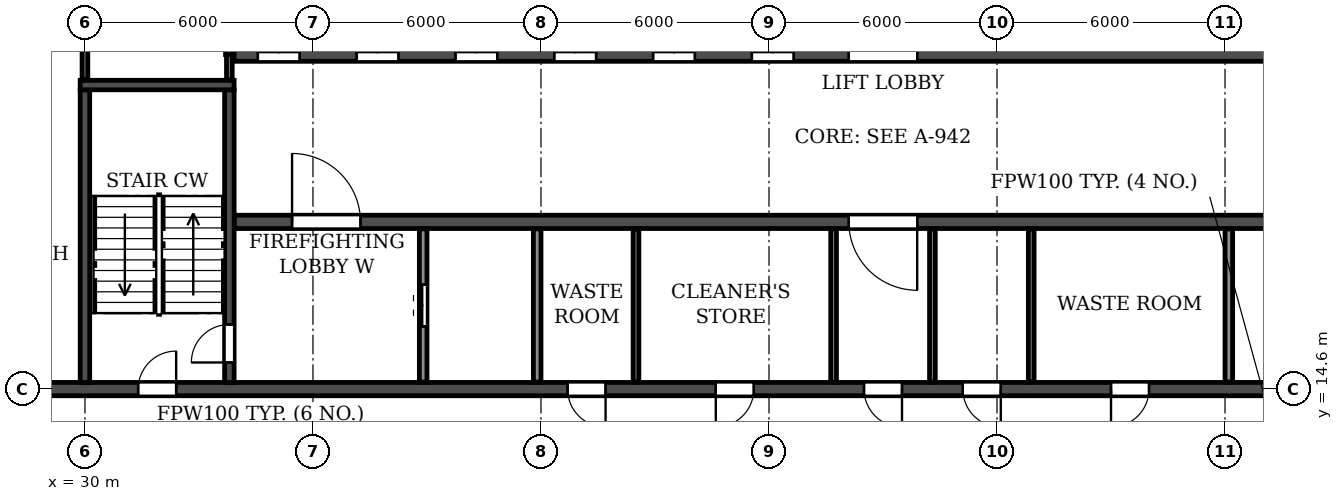
"""IFC4 building model, lengths in metres.
Left out: names, types, materials, properties, quantities, classifications, styles, units other than length and angle.
Written with IfcOpenShell. Run it as: python <this file> out.ifc"""

import sys

from ifc_helpers import new_model, si_unit, direction, frame, frame_2d, origin, place, context, subcontext, project, spatial, rectangle, extrude, element, fill, save


model = new_model("IFC4")
c1 = context("Model", 3, precision=1e-05, world=origin(), true_north=direction((0.0, 1.0)))
c2 = subcontext(c1, "Body", "Model", "MODEL_VIEW")
j1 = project(units=[si_unit("LENGTHUNIT", "METRE"), si_unit("PLANEANGLEUNIT", "RADIAN")], contexts=[c1])
p1 = place(None, origin())
s1 = spatial("IfcSite", under=j1, at=p1, CompositionType="ELEMENT")
p2 = place(p1, origin())
s2 = spatial("IfcBuilding", under=s1, at=p2, CompositionType="ELEMENT")
p3 = place(p2, frame((0.0, 0.0, 251.1)))
s3 = spatial("IfcBuildingStorey", under=s2, at=p3, CompositionType="ELEMENT", Elevation=251.1)
p4 = place(p3, frame((18.2, 14.6, 0.0), z_axis=(0.0, 0.0, 1.0), x_axis=(1.0, 0.0, 0.0)))
e1 = element("IfcWall", 1, at=p4, inside=s3, PredefinedType="SOLIDWALL", context=c2, shape_type="SweptSolid", body=[
    extrude(rectangle(XDim=65.6, YDim=0.35, at=frame_2d((32.8, 0.0))), origin(), (0.0, 0.0, 1.0), 3.08),
])
p5 = place(p4, frame((0.7, 0.0, 0.0)))
e2 = element("IfcOpeningElement", 2, at=p5, cuts=e1, PredefinedType="OPENING", context=c2, shape_type="SweptSolid", body=[
    extrude(rectangle(XDim=1.0, YDim=2.1, at=frame_2d((0.5, 1.05))), frame((0.0, 0.185, 0.0), z_axis=(0.0, -1.0, 0.0), x_axis=(1.0, 0.0, 0.0)), (0.0, 0.0, 1.0), 0.37),
])
p6 = place(p4, frame((8.6, 0.0, 0.0)))
e3 = element("IfcOpeningElement", 3, at=p6, cuts=e1, PredefinedType="OPENING", context=c2, shape_type="SweptSolid", body=[
    extrude(rectangle(XDim=1.0, YDim=2.1, at=frame_2d((0.5, 1.05))), frame((0.0, 0.185, 0.0), z_axis=(0.0, -1.0, 0.0), x_axis=(1.0, 0.0, 0.0)), (0.0, 0.0, 1.0), 0.37),
])
p7 = place(p4, frame((13.2, 0.0, 0.0)))
e4 = element("IfcOpeningElement", 4, at=p7, cuts=e1, PredefinedType="OPENING", context=c2, shape_type="SweptSolid", body=[
    extrude(rectangle(XDim=1.0, YDim=2.1, at=frame_2d((0.5, 1.05))), frame((0.0, 0.185, 0.0), z_axis=(0.0, -1.0, 0.0), x_axis=(1.0, 0.0, 0.0)), (0.0, 0.0, 1.0), 0.37),
])
p8 = place(p4, frame((24.5, 0.0, 0.0)))
e5 = element("IfcOpeningElement", 5, at=p8, cuts=e1, PredefinedType="OPENING", context=c2, shape_type="SweptSolid", body=[
    extrude(rectangle(XDim=1.0, YDim=2.1, at=frame_2d((0.5, 1.05))), frame((0.0, 0.185, 0.0), z_axis=(0.0, -1.0, 0.0), x_axis=(1.0, 0.0, 0.0)), (0.0, 0.0, 1.0), 0.37),
])
p9 = place(p4, frame((28.4, 0.0, 0.0)))
e6 = element("IfcOpeningElement", 6, at=p9, cuts=e1, PredefinedType="OPENING", context=c2, shape_type="SweptSolid", body=[
    extrude(rectangle(XDim=1.0, YDim=2.1, at=frame_2d((0.5, 1.05))), frame((0.0, 0.185, 0.0), z_axis=(0.0, -1.0, 0.0), x_axis=(1.0, 0.0, 0.0)), (0.0, 0.0, 1.0), 0.37),
])
p10 = place(p4, frame((32.3, 0.0, 0.0)))
e7 = element("IfcOpeningElement", 7, at=p10, cuts=e1, PredefinedType="OPENING", context=c2, shape_type="SweptSolid", body=[
    extrude(rectangle(XDim=1.0, YDim=2.1, at=frame_2d((0.5, 1.05))), frame((0.0, 0.185, 0.0), z_axis=(0.0, -1.0, 0.0), x_axis=(1.0, 0.0, 0.0)), (0.0, 0.0, 1.0), 0.37),
])
p11 = place(p4, frame((34.9, 0.0, 0.0)))
e8 = element("IfcOpeningElement", 8, at=p11, cuts=e1, PredefinedType="OPENING", context=c2, shape_type="SweptSolid", body=[
    extrude(rectangle(XDim=1.0, YDim=2.1, at=frame_2d((0.5, 1.05))), frame((0.0, 0.185, 0.0), z_axis=(0.0, -1.0, 0.0), x_axis=(1.0, 0.0, 0.0)), (0.0, 0.0, 1.0), 0.37),
])
p12 = place(p4, frame((38.8, 0.0, 0.0)))
e9 = element("IfcOpeningElement", 9, at=p12, cuts=e1, PredefinedType="OPENING", context=c2, shape_type="SweptSolid", body=[
    extrude(rectangle(XDim=1.0, YDim=2.1, at=frame_2d((0.5, 1.05))), frame((0.0, 0.185, 0.0), z_axis=(0.0, -1.0, 0.0), x_axis=(1.0, 0.0, 0.0)), (0.0, 0.0, 1.0), 0.37),
])
p13 = place(p4, frame((51.4, 0.0, 0.0)))
e10 = element("IfcOpeningElement", 10, at=p13, cuts=e1, PredefinedType="OPENING", context=c2, shape_type="SweptSolid", body=[
    extrude(rectangle(XDim=1.0, YDim=2.1, at=frame_2d((0.5, 1.05))), frame((0.0, 0.185, 0.0), z_axis=(0.0, -1.0, 0.0), x_axis=(1.0, 0.0, 0.0)), (0.0, 0.0, 1.0), 0.37),
])
p14 = place(p4, frame((56.0, 0.0, 0.0)))
e11 = element("IfcOpeningElement", 11, at=p14, cuts=e1, PredefinedType="OPENING", context=c2, shape_type="SweptSolid", body=[
    extrude(rectangle(XDim=1.0, YDim=2.1, at=frame_2d((0.5, 1.05))), frame((0.0, 0.185, 0.0), z_axis=(0.0, -1.0, 0.0), x_axis=(1.0, 0.0, 0.0)), (0.0, 0.0, 1.0), 0.37),
])
p15 = place(p4, frame((63.9, 0.0, 0.0)))
e12 = element("IfcOpeningElement", 12, at=p15, cuts=e1, PredefinedType="OPENING", context=c2, shape_type="SweptSolid", body=[
    extrude(rectangle(XDim=1.0, YDim=2.1, at=frame_2d((0.5, 1.05))), frame((0.0, 0.185, 0.0), z_axis=(0.0, -1.0, 0.0), x_axis=(1.0, 0.0, 0.0)), (0.0, 0.0, 1.0), 0.37),
])
p16 = place(p3, frame((33.925, 19.0, 0.0), z_axis=(0.0, 0.0, 1.0), x_axis=(1.0, 0.0, 0.0)))
e13 = element("IfcWall", 13, at=p16, inside=s3, PredefinedType="SOLIDWALL", context=c2, shape_type="SweptSolid", body=[
    extrude(rectangle(XDim=34.15, YDim=0.35, at=frame_2d((17.075, 0.0))), origin(), (0.0, 0.0, 1.0), 3.08),
])
p17 = place(p16, frame((16.175, 0.0, 0.0)))
e14 = element("IfcOpeningElement", 14, at=p17, cuts=e13, PredefinedType="OPENING", context=c2, shape_type="SweptSolid", body=[
    extrude(rectangle(XDim=1.8, YDim=2.1, at=frame_2d((0.9, 1.05))), frame((0.0, 0.185, 0.0), z_axis=(0.0, -1.0, 0.0), x_axis=(1.0, 0.0, 0.0)), (0.0, 0.0, 1.0), 0.37),
])
p18 = place(p16, frame((1.525, 0.0, 0.0)))
e15 = element("IfcOpeningElement", 15, at=p18, cuts=e13, PredefinedType="OPENING", context=c2, shape_type="SweptSolid", body=[
    extrude(rectangle(XDim=1.8, YDim=2.1, at=frame_2d((0.9, 1.05))), frame((0.0, 0.185, 0.0), z_axis=(0.0, -1.0, 0.0), x_axis=(1.0, 0.0, 0.0)), (0.0, 0.0, 1.0), 0.37),
])
p19 = place(p16, frame((30.825, 0.0, 0.0)))
e16 = element("IfcOpeningElement", 16, at=p19, cuts=e13, PredefinedType="OPENING", context=c2, shape_type="SweptSolid", body=[
    extrude(rectangle(XDim=1.8, YDim=2.1, at=frame_2d((0.9, 1.05))), frame((0.0, 0.185, 0.0), z_axis=(0.0, -1.0, 0.0), x_axis=(1.0, 0.0, 0.0)), (0.0, 0.0, 1.0), 0.37),
])
p20 = place(p3, frame((33.925, 23.4, 0.0), z_axis=(0.0, 0.0, 1.0), x_axis=(1.0, 0.0, 0.0)))
e17 = element("IfcWall", 17, at=p20, inside=s3, PredefinedType="SOLIDWALL", context=c2, shape_type="SweptSolid", body=[
    extrude(rectangle(XDim=34.15, YDim=0.35, at=frame_2d((17.075, 0.0))), origin(), (0.0, 0.0, 1.0), 3.08),
])
p21 = place(p20, frame((16.175, 0.0, 0.0)))
e18 = element("IfcOpeningElement", 18, at=p21, cuts=e17, PredefinedType="OPENING", context=c2, shape_type="SweptSolid", body=[
    extrude(rectangle(XDim=1.8, YDim=2.1, at=frame_2d((0.9, 1.05))), frame((0.0, 0.185, 0.0), z_axis=(0.0, -1.0, 0.0), x_axis=(1.0, 0.0, 0.0)), (0.0, 0.0, 1.0), 0.37),
])
p22 = place(p20, frame((0.625, 0.0, 0.0)))
e19 = element("IfcOpeningElement", 19, at=p22, cuts=e17, PredefinedType="OPENING", context=c2, shape_type="SweptSolid", body=[
    extrude(rectangle(XDim=1.1, YDim=2.1, at=frame_2d((0.55, 1.05))), frame((0.0, 0.185, 0.0), z_axis=(0.0, -1.0, 0.0), x_axis=(1.0, 0.0, 0.0)), (0.0, 0.0, 1.0), 0.37),
])
p23 = place(p20, frame((3.225, 0.0, 0.0)))
e20 = element("IfcOpeningElement", 20, at=p23, cuts=e17, PredefinedType="OPENING", context=c2, shape_type="SweptSolid", body=[
    extrude(rectangle(XDim=1.1, YDim=2.1, at=frame_2d((0.55, 1.05))), frame((0.0, 0.185, 0.0), z_axis=(0.0, -1.0, 0.0), x_axis=(1.0, 0.0, 0.0)), (0.0, 0.0, 1.0), 0.37),
])
p24 = place(p20, frame((5.825, 0.0, 0.0)))
e21 = element("IfcOpeningElement", 21, at=p24, cuts=e17, PredefinedType="OPENING", context=c2, shape_type="SweptSolid", body=[
    extrude(rectangle(XDim=1.1, YDim=2.1, at=frame_2d((0.55, 1.05))), frame((0.0, 0.185, 0.0), z_axis=(0.0, -1.0, 0.0), x_axis=(1.0, 0.0, 0.0)), (0.0, 0.0, 1.0), 0.37),
])
p25 = place(p20, frame((8.425, 0.0, 0.0)))
e22 = element("IfcOpeningElement", 22, at=p25, cuts=e17, PredefinedType="OPENING", context=c2, shape_type="SweptSolid", body=[
    extrude(rectangle(XDim=1.1, YDim=2.1, at=frame_2d((0.55, 1.05))), frame((0.0, 0.185, 0.0), z_axis=(0.0, -1.0, 0.0), x_axis=(1.0, 0.0, 0.0)), (0.0, 0.0, 1.0), 0.37),
])
p26 = place(p20, frame((11.025, 0.0, 0.0)))
e23 = element("IfcOpeningElement", 23, at=p26, cuts=e17, PredefinedType="OPENING", context=c2, shape_type="SweptSolid", body=[
    extrude(rectangle(XDim=1.1, YDim=2.1, at=frame_2d((0.55, 1.05))), frame((0.0, 0.185, 0.0), z_axis=(0.0, -1.0, 0.0), x_axis=(1.0, 0.0, 0.0)), (0.0, 0.0, 1.0), 0.37),
])
p27 = place(p20, frame((13.625, 0.0, 0.0)))
e24 = element("IfcOpeningElement", 24, at=p27, cuts=e17, PredefinedType="OPENING", context=c2, shape_type="SweptSolid", body=[
    extrude(rectangle(XDim=1.1, YDim=2.1, at=frame_2d((0.55, 1.05))), frame((0.0, 0.185, 0.0), z_axis=(0.0, -1.0, 0.0), x_axis=(1.0, 0.0, 0.0)), (0.0, 0.0, 1.0), 0.37),
])
p28 = place(p20, frame((27.225, 0.0, 0.0)))
e25 = element("IfcOpeningElement", 25, at=p28, cuts=e17, PredefinedType="OPENING", context=c2, shape_type="SweptSolid", body=[
    extrude(rectangle(XDim=1.1, YDim=2.1, at=frame_2d((0.55, 1.05))), frame((0.0, 0.185, 0.0), z_axis=(0.0, -1.0, 0.0), x_axis=(1.0, 0.0, 0.0)), (0.0, 0.0, 1.0), 0.37),
])
p29 = place(p3, frame((30.0, 14.775, 0.0), z_axis=(0.0, 0.0, 1.0), x_axis=(0.0, 1.0, 0.0)))
e26 = element("IfcWall", 26, at=p29, inside=s3, PredefinedType="SOLIDWALL", context=c2, shape_type="SweptSolid", body=[
    extrude(rectangle(XDim=7.7, YDim=0.25, at=frame_2d((3.85, 0.0))), origin(), (0.0, 0.0, 1.0), 3.08),
])
p30 = place(p3, frame((33.8, 14.775, 0.0), z_axis=(0.0, 0.0, 1.0), x_axis=(0.0, 1.0, 0.0)))
e27 = element("IfcWall", 27, at=p30, inside=s3, PredefinedType="SOLIDWALL", context=c2, shape_type="SweptSolid", body=[
    extrude(rectangle(XDim=7.7, YDim=0.25, at=frame_2d((3.85, 0.0))), origin(), (0.0, 0.0, 1.0), 3.08),
])
p31 = place(p30, frame((0.525, 0.0, 0.0)))
e28 = element("IfcOpeningElement", 28, at=p31, cuts=e27, PredefinedType="OPENING", context=c2, shape_type="SweptSolid", body=[
    extrude(rectangle(XDim=1.0, YDim=2.1, at=frame_2d((0.5, 1.05))), frame((0.0, 0.135, 0.0), z_axis=(0.0, -1.0, 0.0), x_axis=(1.0, 0.0, 0.0)), (0.0, 0.0, 1.0), 0.27),
])
p32 = place(p3, frame((29.875, 22.6, 0.0), z_axis=(0.0, 0.0, 1.0), x_axis=(1.0, 0.0, 0.0)))
e29 = element("IfcWall", 29, at=p32, inside=s3, PredefinedType="SOLIDWALL", context=c2, shape_type="SweptSolid", body=[
    extrude(rectangle(XDim=4.05, YDim=0.25, at=frame_2d((2.025, 0.0))), origin(), (0.0, 0.0, 1.0), 3.08),
])
for number, where, z_axis, x_axis in (
    (30, (49.7, 14.785, 0.0), (0.0, 0.0, 1.0), (0.0, 1.0, 0.0)),
    (31, (52.3, 14.785, 0.0), (0.0, 0.0, 1.0), (0.0, 1.0, 0.0)),
    (32, (44.5, 14.785, 0.0), (0.0, 0.0, 1.0), (0.0, 1.0, 0.0)),
    (33, (54.9, 14.785, 0.0), (0.0, 0.0, 1.0), (0.0, 1.0, 0.0)),
):
    element("IfcWall", number, at=place(p3, frame(where, z_axis=z_axis, x_axis=x_axis)), inside=s3, PredefinedType="PARTITIONING", context=c2, shape_type="SweptSolid", body=[
        extrude(rectangle(XDim=4.03, YDim=0.15, at=frame_2d((2.015, 0.0))), origin(), (0.0, 0.0, 1.0), 3.08),
    ])
p33 = place(p3, frame((30.0, 22.735, 0.0), z_axis=(0.0, 0.0, 1.0), x_axis=(0.0, 1.0, 0.0)))
e34 = element("IfcWall", 34, at=p33, inside=s3, PredefinedType="PARTITIONING", context=c2, shape_type="SweptSolid", body=[
    extrude(rectangle(XDim=4.88, YDim=0.15, at=frame_2d((2.44, 0.0))), origin(), (0.0, 0.0, 1.0), 3.08),
])
p34 = place(p3, frame((33.8, 22.735, 0.0), z_axis=(0.0, 0.0, 1.0), x_axis=(0.0, 1.0, 0.0)))
e35 = element("IfcWall", 35, at=p34, inside=s3, PredefinedType="PARTITIONING", context=c2, shape_type="SweptSolid", body=[
    extrude(rectangle(XDim=0.665, YDim=0.15, at=frame_2d((0.333, 0.0))), origin(), (0.0, 0.0, 1.0), 3.08),
])
p35 = place(p3, frame((33.8, 23.4, 0.0), z_axis=(0.0, 0.0, 1.0), x_axis=(0.0, 1.0, 0.0)))
e36 = element("IfcWall", 36, at=p35, inside=s3, PredefinedType="PARTITIONING", context=c2, shape_type="SweptSolid", body=[
    extrude(rectangle(XDim=2.7, YDim=0.2, at=frame_2d((1.35, 0.0))), origin(), (0.0, 0.0, 1.0), 3.08),
])
p36 = place(p3, frame((38.9, 14.785, 0.0), z_axis=(0.0, 0.0, 1.0), x_axis=(0.0, 1.0, 0.0)))
e37 = element("IfcWall", 37, at=p36, inside=s3, PredefinedType="PARTITIONING", context=c2, shape_type="SweptSolid", body=[
    extrude(rectangle(XDim=4.03, YDim=0.2, at=frame_2d((2.015, 0.0))), origin(), (0.0, 0.0, 1.0), 3.08),
])
p37 = place(p36, frame((1.465, 0.0, 0.0)))
e38 = element("IfcOpeningElement", 38, at=p37, cuts=e37, PredefinedType="OPENING", context=c2, shape_type="SweptSolid", body=[
    extrude(rectangle(XDim=1.1, YDim=2.1, at=frame_2d((0.55, 1.05))), frame((0.0, 0.11, 0.0), z_axis=(0.0, -1.0, 0.0), x_axis=(1.0, 0.0, 0.0)), (0.0, 0.0, 1.0), 0.22),
])
for number, where, z_axis, x_axis in (
    (39, (41.9, 14.785, 0.0), (0.0, 0.0, 1.0), (0.0, 1.0, 0.0)),
    (40, (60.1, 14.785, 0.0), (0.0, 0.0, 1.0), (0.0, 1.0, 0.0)),
):
    element("IfcWall", number, at=place(p3, frame(where, z_axis=z_axis, x_axis=x_axis)), inside=s3, PredefinedType="PARTITIONING", context=c2, shape_type="SweptSolid", body=[
        extrude(rectangle(XDim=4.03, YDim=0.2, at=frame_2d((2.015, 0.0))), origin(), (0.0, 0.0, 1.0), 3.08),
    ])
p38 = place(p7, origin())
e41 = element("IfcDoor", 41, at=p38, inside=s3, OperationType="SINGLE_SWING_RIGHT", PredefinedType="DOOR", context=c2, shape_type="SweptSolid", body=[
    extrude(rectangle(XDim=1.0, YDim=2.1, at=frame_2d((0.5, 1.05))), frame((0.0, 0.025, 0.0), z_axis=(0.0, -1.0, 0.0), x_axis=(1.0, 0.0, 0.0)), (0.0, 0.0, 1.0), 0.05),
])
fill(e4, e41)
p39 = place(p8, frame((1.0, 0.0, 0.0), z_axis=(0.0, 0.0, 1.0), x_axis=(-1.0, 0.0, 0.0)))
e42 = element("IfcDoor", 42, at=p39, inside=s3, OperationType="SINGLE_SWING_LEFT", PredefinedType="DOOR", context=c2, shape_type="SweptSolid", body=[
    extrude(rectangle(XDim=1.0, YDim=2.1, at=frame_2d((0.5, 1.05))), frame((0.0, 0.025, 0.0), z_axis=(0.0, -1.0, 0.0), x_axis=(1.0, 0.0, 0.0)), (0.0, 0.0, 1.0), 0.05),
])
fill(e5, e42)
p40 = place(p9, frame((1.0, 0.0, 0.0), z_axis=(0.0, 0.0, 1.0), x_axis=(-1.0, 0.0, 0.0)))
e43 = element("IfcDoor", 43, at=p40, inside=s3, OperationType="SINGLE_SWING_RIGHT", PredefinedType="DOOR", context=c2, shape_type="SweptSolid", body=[
    extrude(rectangle(XDim=1.0, YDim=2.1, at=frame_2d((0.5, 1.05))), frame((0.0, 0.025, 0.0), z_axis=(0.0, -1.0, 0.0), x_axis=(1.0, 0.0, 0.0)), (0.0, 0.0, 1.0), 0.05),
])
fill(e6, e43)
p41 = place(p10, frame((1.0, 0.0, 0.0), z_axis=(0.0, 0.0, 1.0), x_axis=(-1.0, 0.0, 0.0)))
e44 = element("IfcDoor", 44, at=p41, inside=s3, OperationType="SINGLE_SWING_LEFT", PredefinedType="DOOR", context=c2, shape_type="SweptSolid", body=[
    extrude(rectangle(XDim=1.0, YDim=2.1, at=frame_2d((0.5, 1.05))), frame((0.0, 0.025, 0.0), z_axis=(0.0, -1.0, 0.0), x_axis=(1.0, 0.0, 0.0)), (0.0, 0.0, 1.0), 0.05),
])
fill(e7, e44)
p42 = place(p11, frame((1.0, 0.0, 0.0), z_axis=(0.0, 0.0, 1.0), x_axis=(-1.0, 0.0, 0.0)))
e45 = element("IfcDoor", 45, at=p42, inside=s3, OperationType="SINGLE_SWING_LEFT", PredefinedType="DOOR", context=c2, shape_type="SweptSolid", body=[
    extrude(rectangle(XDim=1.0, YDim=2.1, at=frame_2d((0.5, 1.05))), frame((0.0, 0.025, 0.0), z_axis=(0.0, -1.0, 0.0), x_axis=(1.0, 0.0, 0.0)), (0.0, 0.0, 1.0), 0.05),
])
fill(e8, e45)
p43 = place(p12, frame((1.0, 0.0, 0.0), z_axis=(0.0, 0.0, 1.0), x_axis=(-1.0, 0.0, 0.0)))
e46 = element("IfcDoor", 46, at=p43, inside=s3, OperationType="SINGLE_SWING_RIGHT", PredefinedType="DOOR", context=c2, shape_type="SweptSolid", body=[
    extrude(rectangle(XDim=1.0, YDim=2.1, at=frame_2d((0.5, 1.05))), frame((0.0, 0.025, 0.0), z_axis=(0.0, -1.0, 0.0), x_axis=(1.0, 0.0, 0.0)), (0.0, 0.0, 1.0), 0.05),
])
fill(e9, e46)
p44 = place(p31, origin())
e47 = element("IfcDoor", 47, at=p44, inside=s3, OperationType="SINGLE_SWING_LEFT", PredefinedType="DOOR", context=c2, shape_type="SweptSolid", body=[
    extrude(rectangle(XDim=1.0, YDim=2.1, at=frame_2d((0.5, 1.05))), frame((0.0, 0.025, 0.0), z_axis=(0.0, -1.0, 0.0), x_axis=(1.0, 0.0, 0.0)), (0.0, 0.0, 1.0), 0.05),
])
fill(e28, e47)
p45 = place(p37, origin())
e48 = element("IfcDoor", 48, at=p45, inside=s3, OperationType="DOUBLE_DOOR_SLIDING", PredefinedType="DOOR", context=c2, shape_type="SweptSolid", body=[
    extrude(rectangle(XDim=1.1, YDim=2.1, at=frame_2d((0.55, 1.05))), frame((0.0, 0.025, 0.0), z_axis=(0.0, -1.0, 0.0), x_axis=(1.0, 0.0, 0.0)), (0.0, 0.0, 1.0), 0.05),
])
fill(e38, e48)
p46 = place(p21, origin())
e49 = element("IfcDoor", 49, at=p46, inside=s3, OperationType="DOUBLE_DOOR_SINGLE_SWING", PredefinedType="DOOR", context=c2, shape_type="SweptSolid", body=[
    extrude(rectangle(XDim=1.8, YDim=2.1, at=frame_2d((0.9, 1.05))), frame((0.0, 0.025, 0.0), z_axis=(0.0, -1.0, 0.0), x_axis=(1.0, 0.0, 0.0)), (0.0, 0.0, 1.0), 0.05),
])
fill(e18, e49)
p47 = place(p17, frame((1.8, 0.0, 0.0), z_axis=(0.0, 0.0, 1.0), x_axis=(-1.0, 0.0, 0.0)))
e50 = element("IfcDoor", 50, at=p47, inside=s3, OperationType="DOUBLE_DOOR_SINGLE_SWING", PredefinedType="DOOR", context=c2, shape_type="SweptSolid", body=[
    extrude(rectangle(XDim=1.8, YDim=2.1, at=frame_2d((0.9, 1.05))), frame((0.0, 0.025, 0.0), z_axis=(0.0, -1.0, 0.0), x_axis=(1.0, 0.0, 0.0)), (0.0, 0.0, 1.0), 0.05),
])
fill(e14, e50)
p48 = place(p22, origin())
e51 = element("IfcDoor", 51, at=p48, inside=s3, OperationType="DOUBLE_DOOR_SLIDING", PredefinedType="DOOR", context=c2, shape_type="SweptSolid", body=[
    extrude(rectangle(XDim=1.1, YDim=2.1, at=frame_2d((0.55, 1.05))), frame((0.0, 0.025, 0.0), z_axis=(0.0, -1.0, 0.0), x_axis=(1.0, 0.0, 0.0)), (0.0, 0.0, 1.0), 0.05),
])
fill(e19, e51)
p49 = place(p18, origin())
e52 = element("IfcDoor", 52, at=p49, inside=s3, OperationType="DOUBLE_DOOR_SINGLE_SWING", PredefinedType="DOOR", context=c2, shape_type="SweptSolid", body=[
    extrude(rectangle(XDim=1.8, YDim=2.1, at=frame_2d((0.9, 1.05))), frame((0.0, 0.025, 0.0), z_axis=(0.0, -1.0, 0.0), x_axis=(1.0, 0.0, 0.0)), (0.0, 0.0, 1.0), 0.05),
])
fill(e15, e52)
p50 = place(p23, origin())
e53 = element("IfcDoor", 53, at=p50, inside=s3, OperationType="DOUBLE_DOOR_SLIDING", PredefinedType="DOOR", context=c2, shape_type="SweptSolid", body=[
    extrude(rectangle(XDim=1.1, YDim=2.1, at=frame_2d((0.55, 1.05))), frame((0.0, 0.025, 0.0), z_axis=(0.0, -1.0, 0.0), x_axis=(1.0, 0.0, 0.0)), (0.0, 0.0, 1.0), 0.05),
])
fill(e20, e53)
p51 = place(p24, origin())
e54 = element("IfcDoor", 54, at=p51, inside=s3, OperationType="DOUBLE_DOOR_SLIDING", PredefinedType="DOOR", context=c2, shape_type="SweptSolid", body=[
    extrude(rectangle(XDim=1.1, YDim=2.1, at=frame_2d((0.55, 1.05))), frame((0.0, 0.025, 0.0), z_axis=(0.0, -1.0, 0.0), x_axis=(1.0, 0.0, 0.0)), (0.0, 0.0, 1.0), 0.05),
])
fill(e21, e54)
p52 = place(p25, origin())
e55 = element("IfcDoor", 55, at=p52, inside=s3, OperationType="DOUBLE_DOOR_SLIDING", PredefinedType="DOOR", context=c2, shape_type="SweptSolid", body=[
    extrude(rectangle(XDim=1.1, YDim=2.1, at=frame_2d((0.55, 1.05))), frame((0.0, 0.025, 0.0), z_axis=(0.0, -1.0, 0.0), x_axis=(1.0, 0.0, 0.0)), (0.0, 0.0, 1.0), 0.05),
])
fill(e22, e55)
p53 = place(p26, origin())
e56 = element("IfcDoor", 56, at=p53, inside=s3, OperationType="DOUBLE_DOOR_SLIDING", PredefinedType="DOOR", context=c2, shape_type="SweptSolid", body=[
    extrude(rectangle(XDim=1.1, YDim=2.1, at=frame_2d((0.55, 1.05))), frame((0.0, 0.025, 0.0), z_axis=(0.0, -1.0, 0.0), x_axis=(1.0, 0.0, 0.0)), (0.0, 0.0, 1.0), 0.05),
])
fill(e23, e56)
p54 = place(p27, origin())
e57 = element("IfcDoor", 57, at=p54, inside=s3, OperationType="DOUBLE_DOOR_SLIDING", PredefinedType="DOOR", context=c2, shape_type="SweptSolid", body=[
    extrude(rectangle(XDim=1.1, YDim=2.1, at=frame_2d((0.55, 1.05))), frame((0.0, 0.025, 0.0), z_axis=(0.0, -1.0, 0.0), x_axis=(1.0, 0.0, 0.0)), (0.0, 0.0, 1.0), 0.05),
])
fill(e24, e57)
save(model, sys.argv[1])
